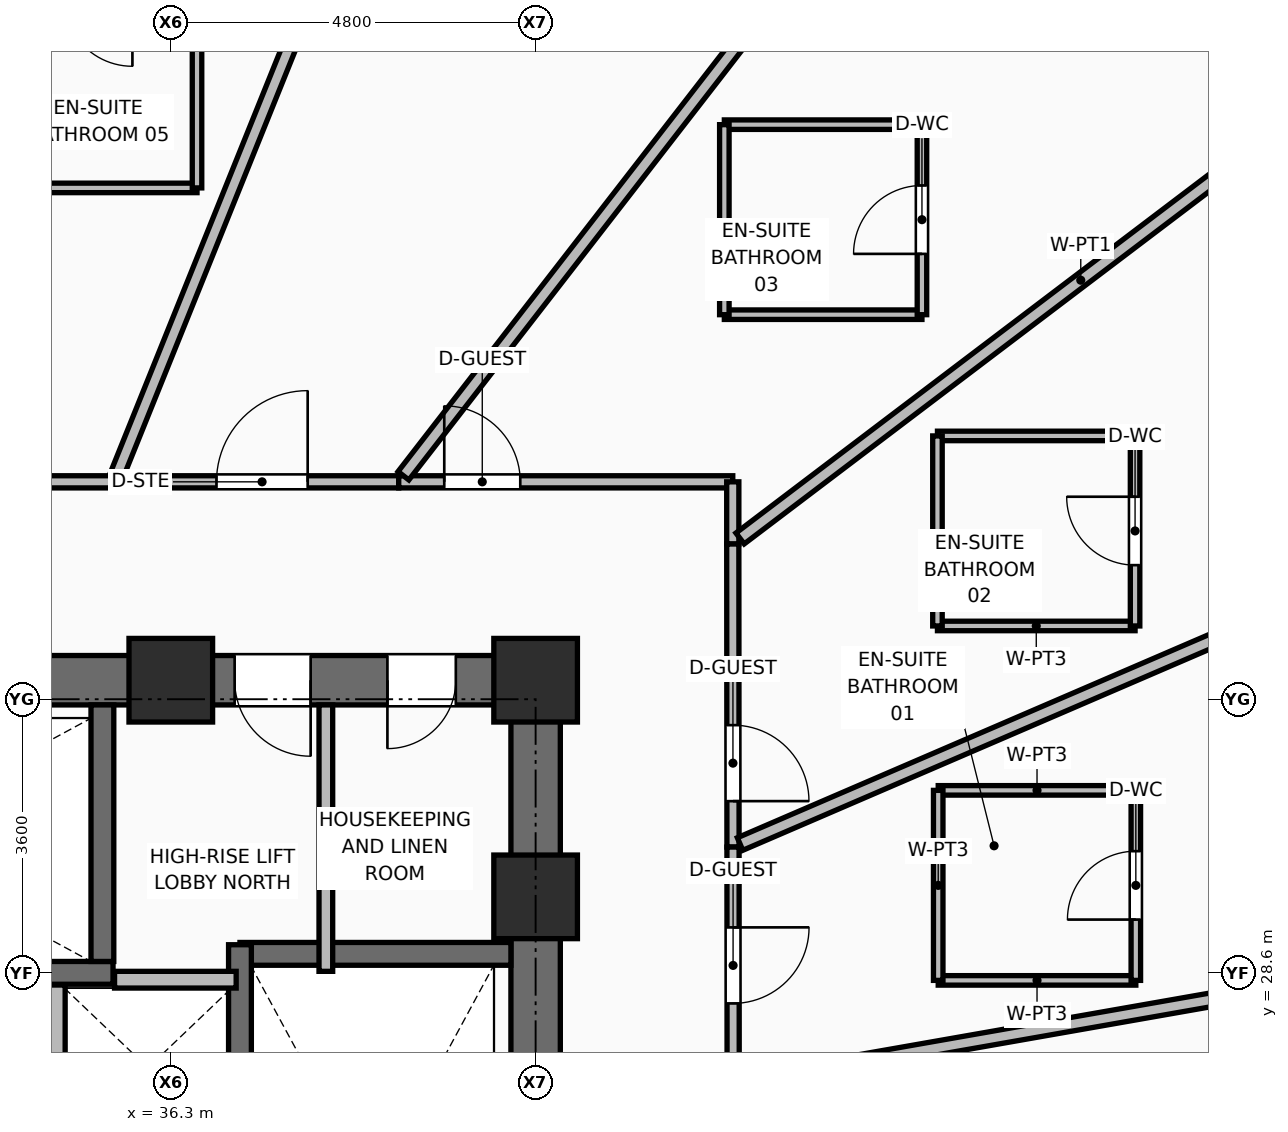
"""IFC4 building model, lengths in metres.
Left out: names, types, materials, properties, quantities, classifications, styles, units other than length and angle.
Written with IfcOpenShell. Run it as: python <this file> out.ifc"""

import sys

from ifc_helpers import new_model, si_unit, direction, frame, frame_2d, origin, origin_2d, place, context, subcontext, project, spatial, rectangle, extrude, element, fill, save


model = new_model("IFC4")
c1 = context("Model", 3, precision=1e-05, world=origin(), true_north=direction((0.0, 1.0)))
c2 = subcontext(c1, "Body", "Model", "MODEL_VIEW")
j1 = project(units=[si_unit("LENGTHUNIT", "METRE"), si_unit("PLANEANGLEUNIT", "RADIAN")], contexts=[c1])
p1 = place(None, origin())
s1 = spatial("IfcSite", under=j1, at=p1, CompositionType="ELEMENT")
p2 = place(p1, origin())
s2 = spatial("IfcBuilding", under=s1, at=p2, CompositionType="ELEMENT")
p3 = place(p2, frame((0.0, 0.0, 64.5)))
s3 = spatial("IfcBuildingStorey", under=s2, at=p3, CompositionType="ELEMENT", Elevation=64.5)
for number, where, z_axis, x_axis in (
    (1, (41.1, 29.6, 0.0), (0.0, 0.0, 1.0), (1.0, 0.0, 0.0)),
    (2, (36.3, 32.45, 0.0), (0.0, 0.0, 1.0), (1.0, 0.0, 0.0)),
    (3, (41.1, 32.45, 0.0), (0.0, 0.0, 1.0), (1.0, 0.0, 0.0)),
):
    element("IfcColumn", number, at=place(p3, frame(where, z_axis=z_axis, x_axis=x_axis)), inside=s3, PredefinedType="COLUMN", context=c2, shape_type="SweptSolid", body=[
        extrude(rectangle(XDim=1.1, YDim=1.1, at=origin_2d()), origin(), (0.0, 0.0, 1.0), 3.75),
    ])
p4 = place(p3, frame((34.8, 26.23, 0.0), z_axis=(0.0, 0.0, 1.0), x_axis=(0.0, 1.0, 0.0)))
e4 = element("IfcWall", 4, at=p4, inside=s3, PredefinedType="PARTITIONING", context=c2, shape_type="SweptSolid", body=[
    extrude(rectangle(XDim=2.21, YDim=0.22, at=frame_2d((1.105, 0.0))), origin(), (0.0, 0.0, 1.0), 3.545),
])
p5 = place(p3, frame((21.575, 32.45, 0.0), z_axis=(0.0, 0.0, 1.0), x_axis=(1.0, 0.0, 0.0)))
e5 = element("IfcWall", 5, at=p5, inside=s3, PredefinedType="SHEAR", context=c2, shape_type="SweptSolid", body=[
    extrude(rectangle(XDim=19.85, YDim=0.65, at=frame_2d((9.925, 0.0))), origin(), (0.0, 0.0, 1.0), 3.57),
])
p6 = place(p5, frame((2.175, 0.0, 0.0)))
e6 = element("IfcOpeningElement", 6, at=p6, cuts=e5, PredefinedType="OPENING", context=c2, shape_type="SweptSolid", body=[
    extrude(rectangle(XDim=1.1, YDim=2.1, at=frame_2d((0.55, 1.05))), frame((0.0, 0.335, 0.0), z_axis=(0.0, -1.0, 0.0), x_axis=(1.0, 0.0, 0.0)), (0.0, 0.0, 1.0), 0.67),
])
p7 = place(p5, frame((15.565, 0.0, 0.0)))
e7 = element("IfcOpeningElement", 7, at=p7, cuts=e5, PredefinedType="OPENING", context=c2, shape_type="SweptSolid", body=[
    extrude(rectangle(XDim=1.0, YDim=2.1, at=frame_2d((0.5, 1.05))), frame((0.0, 0.335, 0.0), z_axis=(0.0, -1.0, 0.0), x_axis=(1.0, 0.0, 0.0)), (0.0, 0.0, 1.0), 0.67),
])
p8 = place(p5, frame((17.575, 0.0, 0.0)))
e8 = element("IfcOpeningElement", 8, at=p8, cuts=e5, PredefinedType="OPENING", context=c2, shape_type="SweptSolid", body=[
    extrude(rectangle(XDim=0.9, YDim=2.1, at=frame_2d((0.45, 1.05))), frame((0.0, 0.335, 0.0), z_axis=(0.0, -1.0, 0.0), x_axis=(1.0, 0.0, 0.0)), (0.0, 0.0, 1.0), 0.67),
])
p9 = place(p3, frame((41.1, 18.125, 0.0), z_axis=(0.0, 0.0, 1.0), x_axis=(0.0, 1.0, 0.0)))
e9 = element("IfcWall", 9, at=p9, inside=s3, PredefinedType="SHEAR", context=c2, shape_type="SweptSolid", body=[
    extrude(rectangle(XDim=14.0, YDim=0.65, at=frame_2d((7.0, 0.0))), origin(), (0.0, 0.0, 1.0), 3.57),
])
p10 = place(p9, frame((3.335, 0.0, 0.0)))
e10 = element("IfcOpeningElement", 10, at=p10, cuts=e9, PredefinedType="OPENING", context=c2, shape_type="SweptSolid", body=[
    extrude(rectangle(XDim=1.05, YDim=2.1, at=frame_2d((0.525, 1.05))), frame((0.0, 0.335, 0.0), z_axis=(0.0, -1.0, 0.0), x_axis=(1.0, 0.0, 0.0)), (0.0, 0.0, 1.0), 0.67),
])
p11 = place(p3, frame((37.21, 28.85, 0.0), z_axis=(0.0, 0.0, 1.0), x_axis=(1.0, 0.0, 0.0)))
e11 = element("IfcWall", 11, at=p11, inside=s3, PredefinedType="SHEAR", context=c2, shape_type="SweptSolid", body=[
    extrude(rectangle(XDim=3.565, YDim=0.3, at=frame_2d((1.782, 0.0))), origin(), (0.0, 0.0, 1.0), 3.57),
])
p12 = place(p3, frame((37.21, 20.98, 0.0), z_axis=(0.0, 0.0, 1.0), x_axis=(0.0, 1.0, 0.0)))
e12 = element("IfcWall", 12, at=p12, inside=s3, PredefinedType="SHEAR", context=c2, shape_type="SweptSolid", body=[
    extrude(rectangle(XDim=7.99, YDim=0.3, at=frame_2d((3.995, 0.0))), origin(), (0.0, 0.0, 1.0), 3.57),
])
p13 = place(p3, frame((27.51, 28.6, 0.0), z_axis=(0.0, 0.0, 1.0), x_axis=(1.0, 0.0, 0.0)))
e13 = element("IfcWall", 13, at=p13, inside=s3, PredefinedType="SHEAR", context=c2, shape_type="SweptSolid", body=[
    extrude(rectangle(XDim=8.03, YDim=0.3, at=frame_2d((4.015, 0.0))), origin(), (0.0, 0.0, 1.0), 3.57),
])
p14 = place(p3, frame((35.4, 28.75, 0.0), z_axis=(0.0, 0.0, 1.0), x_axis=(0.0, 1.0, 0.0)))
e14 = element("IfcWall", 14, at=p14, inside=s3, PredefinedType="SHEAR", context=c2, shape_type="SweptSolid", body=[
    extrude(rectangle(XDim=3.375, YDim=0.3, at=frame_2d((1.688, 0.0))), origin(), (0.0, 0.0, 1.0), 3.57),
])
p15 = place(p3, frame((35.56, 28.51, 0.0), z_axis=(0.0, 0.0, 1.0), x_axis=(1.0, 0.0, 0.0)))
e15 = element("IfcWall", 15, at=p15, inside=s3, PredefinedType="PARTITIONING", context=c2, shape_type="SweptSolid", body=[
    extrude(rectangle(XDim=1.6, YDim=0.22, at=frame_2d((0.8, 0.0))), origin(), (0.0, 0.0, 1.0), 3.55),
])
p16 = place(p3, frame((38.34, 28.62, 0.0), z_axis=(0.0, 0.0, 1.0), x_axis=(0.0, 1.0, 0.0)))
e16 = element("IfcWall", 16, at=p16, inside=s3, PredefinedType="PARTITIONING", context=c2, shape_type="SweptSolid", body=[
    extrude(rectangle(XDim=3.505, YDim=0.18, at=frame_2d((1.752, 0.0))), origin(), (0.0, 0.0, 1.0), 3.55),
])
p17 = place(p3, frame((32.475, 35.06, 0.0), z_axis=(0.0, 0.0, 1.0), x_axis=(1.0, 0.0, 0.0)))
e17 = element("IfcWall", 17, at=p17, inside=s3, PredefinedType="PARTITIONING", context=c2, shape_type="SweptSolid", body=[
    extrude(rectangle(XDim=3.079, YDim=0.16, at=frame_2d((1.54, 0.0))), origin(), (0.0, 0.0, 1.0), 3.55),
])
p18 = place(p17, frame((1.04, 0.0, 0.0)))
e18 = element("IfcOpeningElement", 18, at=p18, cuts=e17, PredefinedType="OPENING", context=c2, shape_type="SweptSolid", body=[
    extrude(rectangle(XDim=1.0, YDim=2.1, at=frame_2d((0.5, 1.05))), frame((0.0, 0.09, 0.0), z_axis=(0.0, -1.0, 0.0), x_axis=(1.0, 0.0, 0.0)), (0.0, 0.0, 1.0), 0.18),
])
p19 = place(p3, frame((35.554, 35.06, 0.0), z_axis=(0.0, 0.0, 1.0), x_axis=(1.0, 0.0, 0.0)))
e19 = element("IfcWall", 19, at=p19, inside=s3, PredefinedType="PARTITIONING", context=c2, shape_type="SweptSolid", body=[
    extrude(rectangle(XDim=3.745, YDim=0.16, at=frame_2d((1.873, 0.0))), origin(), (0.0, 0.0, 1.0), 3.55),
])
p20 = place(p19, frame((1.347, 0.0, 0.0)))
e20 = element("IfcOpeningElement", 20, at=p20, cuts=e19, PredefinedType="OPENING", context=c2, shape_type="SweptSolid", body=[
    extrude(rectangle(XDim=1.2, YDim=2.1, at=frame_2d((0.6, 1.05))), frame((0.0, 0.09, 0.0), z_axis=(0.0, -1.0, 0.0), x_axis=(1.0, 0.0, 0.0)), (0.0, 0.0, 1.0), 0.18),
])
p21 = place(p3, frame((39.299, 35.06, 0.0), z_axis=(0.0, 0.0, 1.0), x_axis=(1.0, 0.0, 0.0)))
e21 = element("IfcWall", 21, at=p21, inside=s3, PredefinedType="PARTITIONING", context=c2, shape_type="SweptSolid", body=[
    extrude(rectangle(XDim=4.395, YDim=0.16, at=frame_2d((2.198, 0.0))), origin(), (0.0, 0.0, 1.0), 2.888),
])
p22 = place(p21, frame((0.599, 0.0, 0.0)))
e22 = element("IfcOpeningElement", 22, at=p22, cuts=e21, PredefinedType="OPENING", context=c2, shape_type="SweptSolid", body=[
    extrude(rectangle(XDim=1.0, YDim=2.1, at=frame_2d((0.5, 1.05))), frame((0.0, 0.09, 0.0), z_axis=(0.0, -1.0, 0.0), x_axis=(1.0, 0.0, 0.0)), (0.0, 0.0, 1.0), 0.18),
])
p23 = place(p3, frame((43.694, 35.06, 0.0), z_axis=(0.0, 0.0, 1.0), x_axis=(0.0, -1.0, 0.0)))
e23 = element("IfcWall", 23, at=p23, inside=s3, PredefinedType="PARTITIONING", context=c2, shape_type="SweptSolid", body=[
    extrude(rectangle(XDim=0.818, YDim=0.16, at=frame_2d((0.409, 0.0))), origin(), (0.0, 0.0, 1.0), 3.55),
])
p24 = place(p3, frame((43.694, 34.242, 0.0), z_axis=(0.0, 0.0, 1.0), x_axis=(0.00073479865, -0.999999730035, 0.0)))
e24 = element("IfcWall", 24, at=p24, inside=s3, PredefinedType="PARTITIONING", context=c2, shape_type="SweptSolid", body=[
    extrude(rectangle(XDim=3.987, YDim=0.16, at=frame_2d((1.994, 0.0))), origin(), (0.0, 0.0, 1.0), 2.888),
])
p25 = place(p24, frame((2.383, 0.0, 0.0)))
e25 = element("IfcOpeningElement", 25, at=p25, cuts=e24, PredefinedType="OPENING", context=c2, shape_type="SweptSolid", body=[
    extrude(rectangle(XDim=1.0, YDim=2.1, at=frame_2d((0.5, 1.05))), frame((0.0, 0.09, 0.0), z_axis=(0.0, -1.0, 0.0), x_axis=(1.0, 0.0, 0.0)), (0.0, 0.0, 1.0), 0.18),
])
p26 = place(p3, frame((43.697, 30.255, 0.0), z_axis=(0.0, 0.0, 1.0), x_axis=(0.000627450857, -0.999999803153, 0.0)))
e26 = element("IfcWall", 26, at=p26, inside=s3, PredefinedType="PARTITIONING", context=c2, shape_type="SweptSolid", body=[
    extrude(rectangle(XDim=3.113, YDim=0.16, at=frame_2d((1.556, 0.0))), origin(), (0.0, 0.0, 1.0), 3.55),
])
p27 = place(p26, frame((1.057, 0.0, 0.0)))
e27 = element("IfcOpeningElement", 27, at=p27, cuts=e26, PredefinedType="OPENING", context=c2, shape_type="SweptSolid", body=[
    extrude(rectangle(XDim=1.0, YDim=2.1, at=frame_2d((0.5, 1.05))), frame((0.0, 0.09, 0.0), z_axis=(0.0, -1.0, 0.0), x_axis=(1.0, 0.0, 0.0)), (0.0, 0.0, 1.0), 0.18),
])
p28 = place(p3, frame((43.79, 27.158, 0.0), z_axis=(0.0, 0.0, 1.0), x_axis=(0.984936685783, 0.172915369471, 0.0)))
e28 = element("IfcWall", 28, at=p28, inside=s3, PredefinedType="PARTITIONING", context=c2, shape_type="SweptSolid", body=[
    extrude(rectangle(XDim=15.274, YDim=0.18, at=frame_2d((7.637, 0.0))), origin(), (0.0, 0.0, 1.0), 2.735),
])
p29 = place(p3, frame((43.79, 30.295, 0.0), z_axis=(0.0, 0.0, 1.0), x_axis=(0.918393435046, 0.395668419846, 0.0)))
e29 = element("IfcWall", 29, at=p29, inside=s3, PredefinedType="PARTITIONING", context=c2, shape_type="SweptSolid", body=[
    extrude(rectangle(XDim=13.875, YDim=0.18, at=frame_2d((6.938, 0.0))), origin(), (0.0, 0.0, 1.0), 2.735),
])
p30 = place(p3, frame((43.79, 34.315, 0.0), z_axis=(0.0, 0.0, 1.0), x_axis=(0.796937326032, 0.604061998786, 0.0)))
e30 = element("IfcWall", 30, at=p30, inside=s3, PredefinedType="PARTITIONING", context=c2, shape_type="SweptSolid", body=[
    extrude(rectangle(XDim=11.249, YDim=0.18, at=frame_2d((5.625, 0.0))), origin(), (0.0, 0.0, 1.0), 2.735),
])
p31 = place(p3, frame((39.361, 35.14, 0.0), z_axis=(0.0, 0.0, 1.0), x_axis=(0.612637755807, 0.790363827714, 0.0)))
e31 = element("IfcWall", 31, at=p31, inside=s3, PredefinedType="PARTITIONING", context=c2, shape_type="SweptSolid", body=[
    extrude(rectangle(XDim=12.981, YDim=0.18, at=frame_2d((6.491, 0.0))), origin(), (0.0, 0.0, 1.0), 2.735),
])
p32 = place(p3, frame((35.586, 35.14, 0.0), z_axis=(0.0, 0.0, 1.0), x_axis=(0.373781962033, 0.927516600853, 0.0)))
e32 = element("IfcWall", 32, at=p32, inside=s3, PredefinedType="PARTITIONING", context=c2, shape_type="SweptSolid", body=[
    extrude(rectangle(XDim=14.321, YDim=0.18, at=frame_2d((7.161, 0.0))), origin(), (0.0, 0.0, 1.0), 2.735),
])
for number, where, z_axis, x_axis in (
    (33, (46.397, 28.501, 0.0), (0.0, 0.0, 1.0), (1.0, 0.0, 0.0)),
    (34, (46.397, 31.001, 0.0), (0.0, 0.0, 1.0), (1.0, 0.0, 0.0)),
):
    element("IfcWall", number, at=place(p3, frame(where, z_axis=z_axis, x_axis=x_axis)), inside=s3, PredefinedType="PARTITIONING", context=c2, shape_type="SweptSolid", body=[
        extrude(rectangle(XDim=2.6, YDim=0.125, at=frame_2d((1.3, 0.0))), origin(), (0.0, 0.0, 1.0), 3.55),
    ])
p33 = place(p3, frame((46.397, 28.501, 0.0), z_axis=(0.0, 0.0, 1.0), x_axis=(0.0, 1.0, 0.0)))
e35 = element("IfcWall", 35, at=p33, inside=s3, PredefinedType="PARTITIONING", context=c2, shape_type="SweptSolid", body=[
    extrude(rectangle(XDim=2.5, YDim=0.125, at=frame_2d((1.25, 0.0))), origin(), (0.0, 0.0, 1.0), 3.55),
])
p34 = place(p3, frame((48.997, 28.501, 0.0), z_axis=(0.0, 0.0, 1.0), x_axis=(0.0, 1.0, 0.0)))
e36 = element("IfcWall", 36, at=p34, inside=s3, PredefinedType="PARTITIONING", context=c2, shape_type="SweptSolid", body=[
    extrude(rectangle(XDim=2.5, YDim=0.125, at=frame_2d((1.25, 0.0))), origin(), (0.0, 0.0, 1.0), 3.55),
])
p35 = place(p34, frame((0.8, 0.0, 0.0)))
e37 = element("IfcOpeningElement", 37, at=p35, cuts=e36, PredefinedType="OPENING", context=c2, shape_type="SweptSolid", body=[
    extrude(rectangle(XDim=0.9, YDim=2.1, at=frame_2d((0.45, 1.05))), frame((0.0, 0.073, 0.0), z_axis=(0.0, -1.0, 0.0), x_axis=(1.0, 0.0, 0.0)), (0.0, 0.0, 1.0), 0.145),
])
for number, where, z_axis, x_axis in (
    (38, (46.387, 33.164, 0.0), (0.0, 0.0, 1.0), (1.0, 0.0, 0.0)),
    (39, (46.387, 35.664, 0.0), (0.0, 0.0, 1.0), (1.0, 0.0, 0.0)),
):
    element("IfcWall", number, at=place(p3, frame(where, z_axis=z_axis, x_axis=x_axis)), inside=s3, PredefinedType="PARTITIONING", context=c2, shape_type="SweptSolid", body=[
        extrude(rectangle(XDim=2.6, YDim=0.125, at=frame_2d((1.3, 0.0))), origin(), (0.0, 0.0, 1.0), 3.55),
    ])
p36 = place(p3, frame((46.387, 33.164, 0.0), z_axis=(0.0, 0.0, 1.0), x_axis=(0.0, 1.0, 0.0)))
e40 = element("IfcWall", 40, at=p36, inside=s3, PredefinedType="PARTITIONING", context=c2, shape_type="SweptSolid", body=[
    extrude(rectangle(XDim=2.5, YDim=0.125, at=frame_2d((1.25, 0.0))), origin(), (0.0, 0.0, 1.0), 2.888),
])
p37 = place(p3, frame((48.987, 33.164, 0.0), z_axis=(0.0, 0.0, 1.0), x_axis=(0.0, 1.0, 0.0)))
e41 = element("IfcWall", 41, at=p37, inside=s3, PredefinedType="PARTITIONING", context=c2, shape_type="SweptSolid", body=[
    extrude(rectangle(XDim=2.5, YDim=0.125, at=frame_2d((1.25, 0.0))), origin(), (0.0, 0.0, 1.0), 2.888),
])
p38 = place(p37, frame((0.8, 0.0, 0.0)))
e42 = element("IfcOpeningElement", 42, at=p38, cuts=e41, PredefinedType="OPENING", context=c2, shape_type="SweptSolid", body=[
    extrude(rectangle(XDim=0.9, YDim=2.1, at=frame_2d((0.45, 1.05))), frame((0.0, 0.073, 0.0), z_axis=(0.0, -1.0, 0.0), x_axis=(1.0, 0.0, 0.0)), (0.0, 0.0, 1.0), 0.145),
])
p39 = place(p3, frame((43.583, 37.259, 0.0), z_axis=(0.0, 0.0, 1.0), x_axis=(1.0, 0.0, 0.0)))
e43 = element("IfcWall", 43, at=p39, inside=s3, PredefinedType="PARTITIONING", context=c2, shape_type="SweptSolid", body=[
    extrude(rectangle(XDim=2.6, YDim=0.125, at=frame_2d((1.3, 0.0))), origin(), (0.0, 0.0, 1.0), 3.178),
])
p40 = place(p3, frame((43.583, 39.759, 0.0), z_axis=(0.0, 0.0, 1.0), x_axis=(1.0, 0.0, 0.0)))
e44 = element("IfcWall", 44, at=p40, inside=s3, PredefinedType="PARTITIONING", context=c2, shape_type="SweptSolid", body=[
    extrude(rectangle(XDim=2.6, YDim=0.125, at=frame_2d((1.3, 0.0))), origin(), (0.0, 0.0, 1.0), 2.888),
])
p41 = place(p3, frame((43.583, 37.259, 0.0), z_axis=(0.0, 0.0, 1.0), x_axis=(0.0, 1.0, 0.0)))
e45 = element("IfcWall", 45, at=p41, inside=s3, PredefinedType="PARTITIONING", context=c2, shape_type="SweptSolid", body=[
    extrude(rectangle(XDim=2.5, YDim=0.125, at=frame_2d((1.25, 0.0))), origin(), (0.0, 0.0, 1.0), 2.888),
])
p42 = place(p3, frame((46.183, 37.259, 0.0), z_axis=(0.0, 0.0, 1.0), x_axis=(0.0, 1.0, 0.0)))
e46 = element("IfcWall", 46, at=p42, inside=s3, PredefinedType="PARTITIONING", context=c2, shape_type="SweptSolid", body=[
    extrude(rectangle(XDim=2.5, YDim=0.125, at=frame_2d((1.25, 0.0))), origin(), (0.0, 0.0, 1.0), 3.178),
])
p43 = place(p42, frame((0.8, 0.0, 0.0)))
e47 = element("IfcOpeningElement", 47, at=p43, cuts=e46, PredefinedType="OPENING", context=c2, shape_type="SweptSolid", body=[
    extrude(rectangle(XDim=0.9, YDim=2.1, at=frame_2d((0.45, 1.05))), frame((0.0, 0.073, 0.0), z_axis=(0.0, -1.0, 0.0), x_axis=(1.0, 0.0, 0.0)), (0.0, 0.0, 1.0), 0.145),
])
p44 = place(p3, frame((34.045, 38.927, 0.0), z_axis=(0.0, 0.0, 1.0), x_axis=(1.0, 0.0, 0.0)))
e48 = element("IfcWall", 48, at=p44, inside=s3, PredefinedType="PARTITIONING", context=c2, shape_type="SweptSolid", body=[
    extrude(rectangle(XDim=2.6, YDim=0.125, at=frame_2d((1.3, 0.0))), origin(), (0.0, 0.0, 1.0), 3.55),
])
p45 = place(p3, frame((36.645, 38.927, 0.0), z_axis=(0.0, 0.0, 1.0), x_axis=(0.0, 1.0, 0.0)))
e49 = element("IfcWall", 49, at=p45, inside=s3, PredefinedType="PARTITIONING", context=c2, shape_type="SweptSolid", body=[
    extrude(rectangle(XDim=2.5, YDim=0.125, at=frame_2d((1.25, 0.0))), origin(), (0.0, 0.0, 1.0), 3.55),
])
p46 = place(p7, frame((1.0, 0.0, 0.0), z_axis=(0.0, 0.0, 1.0), x_axis=(-1.0, 0.0, 0.0)))
e50 = element("IfcDoor", 50, at=p46, inside=s3, OperationType="SINGLE_SWING_LEFT", PredefinedType="DOOR", context=c2, shape_type="SweptSolid", body=[
    extrude(rectangle(XDim=1.0, YDim=2.1, at=frame_2d((0.5, 1.05))), frame((0.0, 0.025, 0.0), z_axis=(0.0, -1.0, 0.0), x_axis=(1.0, 0.0, 0.0)), (0.0, 0.0, 1.0), 0.05),
])
fill(e7, e50)
p47 = place(p8, frame((0.9, 0.0, 0.0), z_axis=(0.0, 0.0, 1.0), x_axis=(-1.0, 0.0, 0.0)))
e51 = element("IfcDoor", 51, at=p47, inside=s3, OperationType="SINGLE_SWING_RIGHT", PredefinedType="DOOR", context=c2, shape_type="SweptSolid", body=[
    extrude(rectangle(XDim=0.9, YDim=2.1, at=frame_2d((0.45, 1.05))), frame((0.0, 0.025, 0.0), z_axis=(0.0, -1.0, 0.0), x_axis=(1.0, 0.0, 0.0)), (0.0, 0.0, 1.0), 0.05),
])
fill(e8, e51)
p48 = place(p35, origin())
e52 = element("IfcDoor", 52, at=p48, inside=s3, OperationType="SINGLE_SWING_LEFT", PredefinedType="DOOR", context=c2, shape_type="SweptSolid", body=[
    extrude(rectangle(XDim=0.9, YDim=2.1, at=frame_2d((0.45, 1.05))), frame((0.0, 0.025, 0.0), z_axis=(0.0, -1.0, 0.0), x_axis=(1.0, 0.0, 0.0)), (0.0, 0.0, 1.0), 0.05),
])
fill(e37, e52)
p49 = place(p27, origin())
e53 = element("IfcDoor", 53, at=p49, inside=s3, OperationType="SINGLE_SWING_LEFT", PredefinedType="DOOR", context=c2, shape_type="SweptSolid", body=[
    extrude(rectangle(XDim=1.0, YDim=2.1, at=frame_2d((0.5, 1.05))), frame((0.0, 0.025, 0.0), z_axis=(0.0, -1.0, 0.0), x_axis=(1.0, 0.0, 0.0)), (0.0, 0.0, 1.0), 0.05),
])
fill(e27, e53)
p50 = place(p38, origin())
e54 = element("IfcDoor", 54, at=p50, inside=s3, OperationType="SINGLE_SWING_RIGHT", PredefinedType="DOOR", context=c2, shape_type="SweptSolid", body=[
    extrude(rectangle(XDim=0.9, YDim=2.1, at=frame_2d((0.45, 1.05))), frame((0.0, 0.025, 0.0), z_axis=(0.0, -1.0, 0.0), x_axis=(1.0, 0.0, 0.0)), (0.0, 0.0, 1.0), 0.05),
])
fill(e42, e54)
p51 = place(p25, origin())
e55 = element("IfcDoor", 55, at=p51, inside=s3, OperationType="SINGLE_SWING_RIGHT", PredefinedType="DOOR", context=c2, shape_type="SweptSolid", body=[
    extrude(rectangle(XDim=1.0, YDim=2.1, at=frame_2d((0.5, 1.05))), frame((0.0, 0.025, 0.0), z_axis=(0.0, -1.0, 0.0), x_axis=(1.0, 0.0, 0.0)), (0.0, 0.0, 1.0), 0.05),
])
fill(e25, e55)
p52 = place(p43, origin())
e56 = element("IfcDoor", 56, at=p52, inside=s3, OperationType="SINGLE_SWING_LEFT", PredefinedType="DOOR", context=c2, shape_type="SweptSolid", body=[
    extrude(rectangle(XDim=0.9, YDim=2.1, at=frame_2d((0.45, 1.05))), frame((0.0, 0.025, 0.0), z_axis=(0.0, -1.0, 0.0), x_axis=(1.0, 0.0, 0.0)), (0.0, 0.0, 1.0), 0.05),
])
fill(e47, e56)
p53 = place(p22, origin())
e57 = element("IfcDoor", 57, at=p53, inside=s3, OperationType="SINGLE_SWING_LEFT", PredefinedType="DOOR", context=c2, shape_type="SweptSolid", body=[
    extrude(rectangle(XDim=1.0, YDim=2.1, at=frame_2d((0.5, 1.05))), frame((0.0, 0.025, 0.0), z_axis=(0.0, -1.0, 0.0), x_axis=(1.0, 0.0, 0.0)), (0.0, 0.0, 1.0), 0.05),
])
fill(e22, e57)
p54 = place(p20, origin())
e58 = element("IfcDoor", 58, at=p54, inside=s3, OperationType="SINGLE_SWING_RIGHT", PredefinedType="DOOR", context=c2, shape_type="SweptSolid", body=[
    extrude(rectangle(XDim=1.2, YDim=2.1, at=frame_2d((0.6, 1.05))), frame((0.0, 0.025, 0.0), z_axis=(0.0, -1.0, 0.0), x_axis=(1.0, 0.0, 0.0)), (0.0, 0.0, 1.0), 0.05),
])
fill(e20, e58)
save(model, sys.argv[1])
